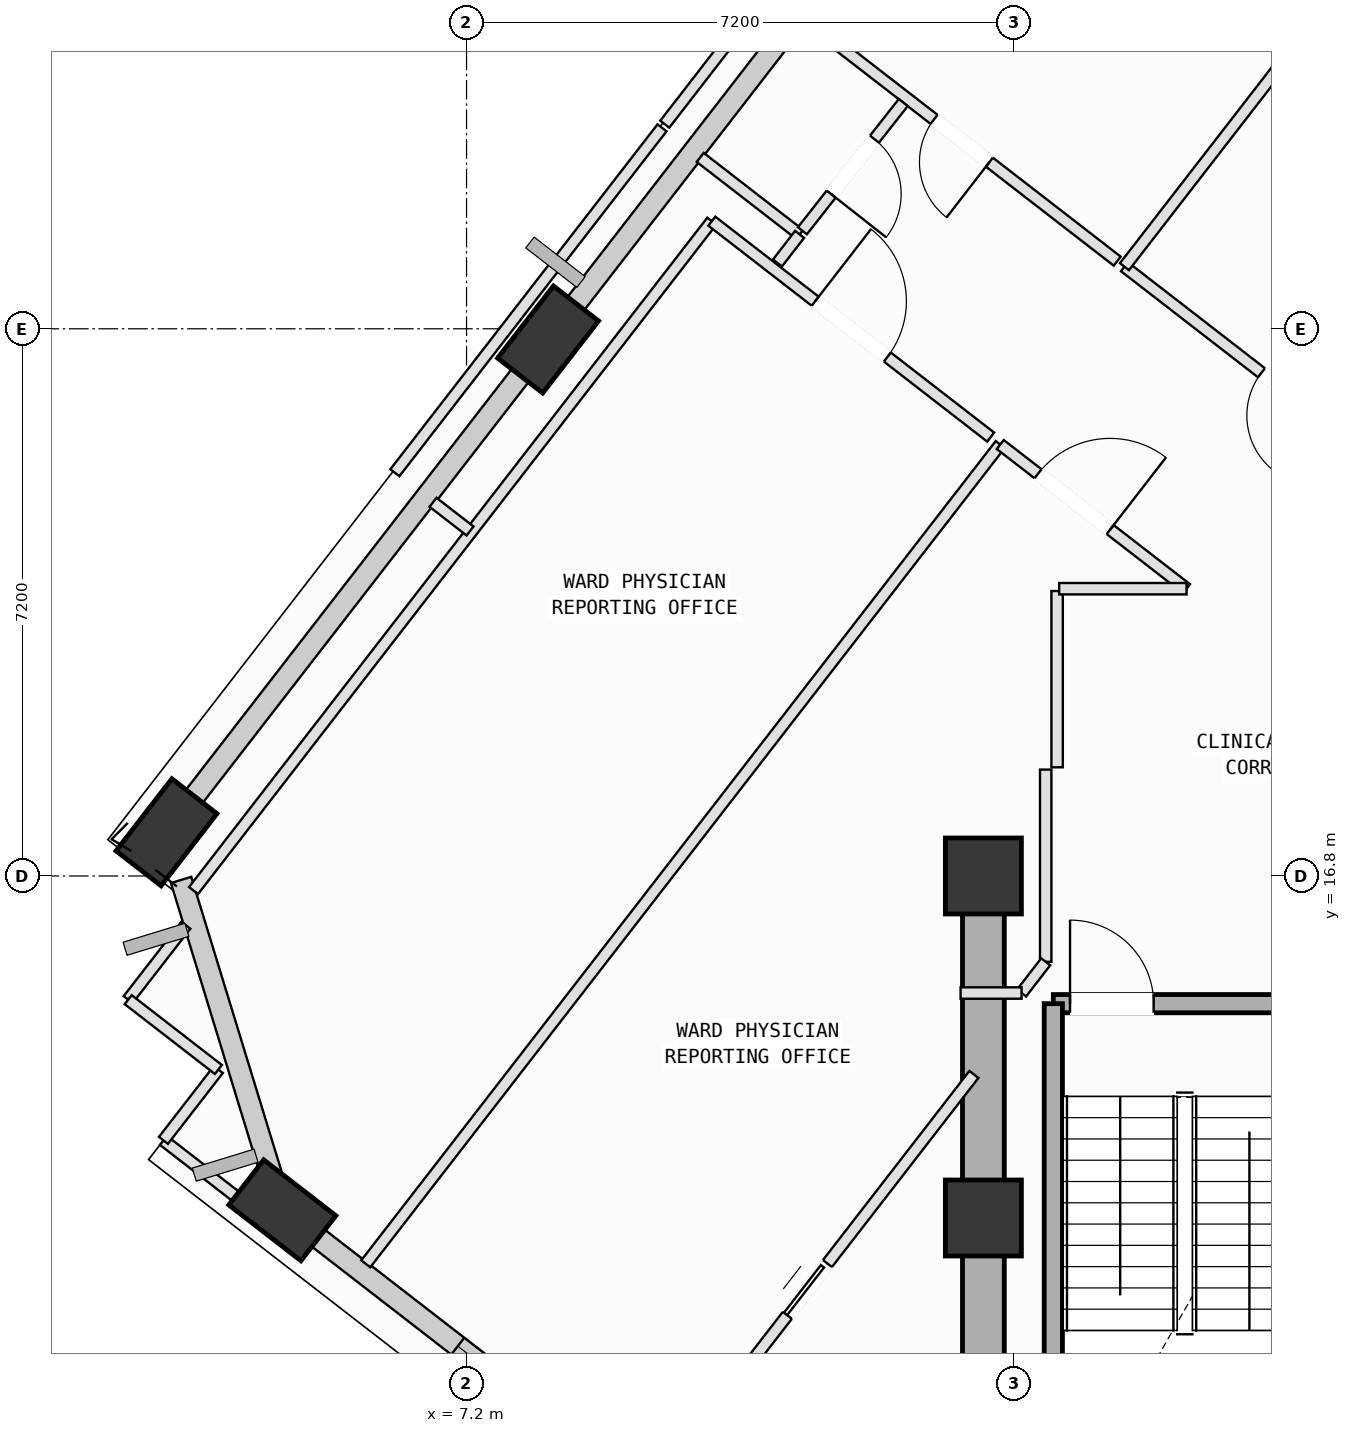
"""IFC4 building model, lengths in metres.
Left out: names, types, materials, properties, quantities, classifications, styles, units other than length and angle.
Written with IfcOpenShell. Run it as: python <this file> out.ifc"""

import sys

from ifc_helpers import new_model, si_unit, direction, frame, frame_2d, origin, origin_2d, place, context, subcontext, project, spatial, rectangle, extrude, element, fill, save


model = new_model("IFC4")
c1 = context("Model", 3, precision=1e-05, world=origin(), true_north=direction((0.0, 1.0)))
c2 = subcontext(c1, "Body", "Model", "MODEL_VIEW")
j1 = project(units=[si_unit("LENGTHUNIT", "METRE"), si_unit("PLANEANGLEUNIT", "RADIAN")], contexts=[c1])
p1 = place(None, origin())
s1 = spatial("IfcSite", under=j1, at=p1, CompositionType="ELEMENT")
p2 = place(p1, origin())
s2 = spatial("IfcBuilding", under=s1, at=p2, CompositionType="ELEMENT")
p3 = place(p2, frame((0.0, 0.0, 247.2)))
s3 = spatial("IfcBuildingStorey", under=s2, at=p3, CompositionType="ELEMENT", Elevation=247.2)
for number, where, z_axis, x_axis in (
    (1, (14.0, 12.3, 0.0), (0.0, 0.0, 1.0), (1.0, 0.0, 0.0)),
    (2, (14.0, 16.8, 0.0), (0.0, 0.0, 1.0), (1.0, 0.0, 0.0)),
):
    element("IfcColumn", number, at=place(p3, frame(where, z_axis=z_axis, x_axis=x_axis)), inside=s3, PredefinedType="COLUMN", context=c2, shape_type="SweptSolid", body=[
        extrude(rectangle(XDim=1.0, YDim=1.0, at=origin_2d()), origin(), (0.0, 0.0, 1.0), 4.0),
    ])
p4 = place(p3, frame((8.272, 23.859, 0.002), z_axis=(0.00479977683, -0.104379956889, 0.994525910543), x_axis=(0.575449404971, 0.813653503986, 0.082619354686)))
e3 = element("IfcColumn", 3, at=p4, inside=s3, PredefinedType="COLUMN", context=c2, shape_type="SweptSolid", body=[
    extrude(rectangle(XDim=1.2, YDim=0.75, at=origin_2d()), origin(), (0.0, 0.0, 1.0), 4.018),
])
p5 = place(p3, frame((3.252, 17.375, 0.002), z_axis=(0.031564824707, -0.124502331616, 0.991717112519), x_axis=(0.400737327413, 0.910546939736, 0.101557200414)))
e4 = element("IfcColumn", 4, at=p5, inside=s3, PredefinedType="COLUMN", context=c2, shape_type="SweptSolid", body=[
    extrude(rectangle(XDim=1.2, YDim=0.75, at=origin_2d()), origin(), (0.0, 0.0, 1.0), 4.03),
])
p6 = place(p3, frame((4.776, 12.401, 0.002), z_axis=(0.051917734031, -0.11807195289, 0.991646894229), x_axis=(-0.96817687498, 0.237482706263, 0.078965201073)))
e5 = element("IfcColumn", 5, at=p6, inside=s3, PredefinedType="COLUMN", context=c2, shape_type="SweptSolid", body=[
    extrude(rectangle(XDim=1.2, YDim=0.75, at=origin_2d()), origin(), (0.0, 0.0, 1.0), 4.03),
])
p7 = place(p3, frame((8.403, 24.028, 0.0), z_axis=(0.0, 0.0, 1.0), x_axis=(0.61220895988, 0.790696015826, 0.0)))
e6 = element("IfcWall", 6, at=p7, inside=s3, PredefinedType="SOLIDWALL", context=c2, shape_type="SweptSolid", body=[
    extrude(rectangle(XDim=7.434, YDim=0.28, at=frame_2d((3.717, 0.0))), origin(), (0.0, 0.0, 1.0), 3.265),
])
p8 = place(p3, frame((3.364, 17.519, 0.0), z_axis=(0.0, 0.0, 1.0), x_axis=(0.612209375749, 0.790695693832, 0.0)))
e7 = element("IfcWall", 7, at=p8, inside=s3, PredefinedType="SOLIDWALL", context=c2, shape_type="SweptSolid", body=[
    extrude(rectangle(XDim=7.485, YDim=0.28, at=frame_2d((3.742, 0.0))), origin(), (0.0, 0.0, 1.0), 3.265),
])
p9 = place(p3, frame((4.736, 12.533, 0.0), z_axis=(0.0, 0.0, 1.0), x_axis=(-0.29287135158, 0.956151855839, 0.0)))
e8 = element("IfcWall", 8, at=p9, inside=s3, PredefinedType="SOLIDWALL", context=c2, shape_type="SweptSolid", body=[
    extrude(rectangle(XDim=4.408, YDim=0.28, at=frame_2d((2.204, 0.0))), origin(), (0.0, 0.0, 1.0), 3.265),
])
p10 = place(p3, frame((9.865, 8.461, 0.0), z_axis=(0.0, 0.0, 1.0), x_axis=(-0.790689704837, 0.612217110725, 0.0)))
e9 = element("IfcWall", 9, at=p10, inside=s3, PredefinedType="SOLIDWALL", context=c2, shape_type="SweptSolid", body=[
    extrude(rectangle(XDim=5.83, YDim=0.28, at=frame_2d((2.915, 0.0))), origin(), (0.0, 0.0, 1.0), 3.265),
])
p11 = place(p10, frame((2.117, 0.0, 0.75)))
e10 = element("IfcOpeningElement", 10, at=p11, cuts=e9, PredefinedType="OPENING", context=c2, shape_type="SweptSolid", body=[
    extrude(rectangle(XDim=1.4, YDim=1.85, at=frame_2d((0.7, 0.925))), frame((0.0, 0.15, 0.0), z_axis=(0.0, -1.0, 0.0), x_axis=(1.0, 0.0, 0.0)), (0.0, 0.0, 1.0), 0.3),
])
p12 = place(p3, frame((14.92, 15.12, 0.0), z_axis=(0.0, 0.0, 1.0), x_axis=(1.0, 0.0, 0.0)))
e11 = element("IfcWall", 11, at=p12, inside=s3, PredefinedType="SOLIDWALL", context=c2, shape_type="SweptSolid", body=[
    extrude(rectangle(XDim=3.46, YDim=0.24, at=frame_2d((1.73, 0.0))), origin(), (0.0, 0.0, 1.0), 3.78),
])
p13 = place(p12, frame((0.22, 0.0, 0.0)))
e12 = element("IfcOpeningElement", 12, at=p13, cuts=e11, PredefinedType="OPENING", context=c2, shape_type="SweptSolid", body=[
    extrude(rectangle(XDim=1.1, YDim=2.15, at=frame_2d((0.55, 1.075))), frame((0.0, 0.13, 0.0), z_axis=(0.0, -1.0, 0.0), x_axis=(1.0, 0.0, 0.0)), (0.0, 0.0, 1.0), 0.26),
])
p14 = place(p3, frame((14.92, 8.075, 0.0), z_axis=(0.0, 0.0, 1.0), x_axis=(0.0, 1.0, 0.0)))
e13 = element("IfcWall", 13, at=p14, inside=s3, PredefinedType="SOLIDWALL", context=c2, shape_type="SweptSolid", body=[
    extrude(rectangle(XDim=7.045, YDim=0.24, at=frame_2d((3.522, 0.0))), origin(), (0.0, 0.0, 1.0), 3.78),
])
p15 = place(p3, frame((14.0, 16.8, 0.0), z_axis=(0.0, 0.0, 1.0), x_axis=(0.0, -1.0, 0.0)))
e14 = element("IfcWall", 14, at=p15, inside=s3, PredefinedType="SHEAR", context=c2, shape_type="SweptSolid", body=[
    extrude(rectangle(XDim=9.0, YDim=0.55, at=frame_2d((4.5, 0.0))), origin(), (0.0, 0.0, 1.0), 3.78),
])
p16 = place(p3, frame((9.67, 8.758, 0.0), z_axis=(0.0, 0.0, 1.0), x_axis=(0.612219073781, 0.790688184874, 0.0)))
e15 = element("IfcWall", 15, at=p16, inside=s3, PredefinedType="PARTITIONING", context=c2, shape_type="SweptSolid", body=[
    extrude(rectangle(XDim=6.869, YDim=0.15, at=frame_2d((3.434, 0.0))), origin(), (0.0, 0.0, 1.0), 3.78),
])
p17 = place(p16, frame((2.861, 0.0, 0.0)))
e16 = element("IfcOpeningElement", 16, at=p17, cuts=e15, PredefinedType="OPENING", context=c2, shape_type="SweptSolid", body=[
    extrude(rectangle(XDim=0.86, YDim=2.06, at=frame_2d((0.43, 1.03))), frame((0.0, 0.085, 0.0), z_axis=(0.0, -1.0, 0.0), x_axis=(1.0, 0.0, 0.0)), (0.0, 0.0, 1.0), 0.17),
])
p18 = place(p3, frame((14.97, 20.55, 0.0), z_axis=(0.0, 0.0, 1.0), x_axis=(0.0, -1.0, 0.0)))
e17 = element("IfcWall", 17, at=p18, inside=s3, PredefinedType="PARTITIONING", context=c2, shape_type="SweptSolid", body=[
    extrude(rectangle(XDim=2.32, YDim=0.15, at=frame_2d((1.16, 0.0))), origin(), (0.0, 0.0, 1.0), 3.78),
])
p19 = place(p3, frame((14.82, 18.2, 0.0), z_axis=(0.0, 0.0, 1.0), x_axis=(0.0, -1.0, 0.0)))
e18 = element("IfcWall", 18, at=p19, inside=s3, PredefinedType="PARTITIONING", context=c2, shape_type="SweptSolid", body=[
    extrude(rectangle(XDim=2.529, YDim=0.15, at=frame_2d((1.265, 0.0))), origin(), (0.0, 0.0, 1.0), 3.78),
])
p20 = place(p3, frame((14.82, 15.671, 0.0), z_axis=(0.0, 0.0, 1.0), x_axis=(-0.612182668934, -0.790716371309, 0.0)))
e19 = element("IfcWall", 19, at=p20, inside=s3, PredefinedType="PARTITIONING", context=c2, shape_type="SweptSolid", body=[
    extrude(rectangle(XDim=0.52, YDim=0.15, at=frame_2d((0.26, 0.0))), origin(), (0.0, 0.0, 1.0), 3.78),
])
p21 = place(p3, frame((14.502, 15.26, 0.0), z_axis=(0.0, 0.0, 1.0), x_axis=(-1.0, 0.0, 0.0)))
e20 = element("IfcWall", 20, at=p21, inside=s3, PredefinedType="PARTITIONING", context=c2, shape_type="SweptSolid", body=[
    extrude(rectangle(XDim=0.802, YDim=0.15, at=frame_2d((0.401, 0.0))), origin(), (0.0, 0.0, 1.0), 3.78),
])
p22 = place(p3, frame((5.874, 11.697, 0.0), z_axis=(0.0, 0.0, 1.0), x_axis=(0.612268172049, 0.790650166316, 0.0)))
e21 = element("IfcWall", 21, at=p22, inside=s3, PredefinedType="PARTITIONING", context=c2, shape_type="SweptSolid", body=[
    extrude(rectangle(XDim=13.634, YDim=0.15, at=frame_2d((6.817, 0.0))), origin(), (0.0, 0.0, 1.0), 3.78),
])
p23 = place(p3, frame((14.222, 22.477, 0.0), z_axis=(0.0, 0.0, 1.0), x_axis=(0.790834390633, -0.612030200719, 0.0)))
e22 = element("IfcWall", 22, at=p23, inside=s3, PredefinedType="PARTITIONING", context=c2, shape_type="SweptSolid", body=[
    extrude(rectangle(XDim=3.099, YDim=0.15, at=frame_2d((1.55, 0.0))), origin(), (0.0, 0.0, 1.0), 3.78),
])
p24 = place(p23, frame((0.628, 0.0, 0.0)))
e23 = element("IfcOpeningElement", 23, at=p24, cuts=e22, PredefinedType="OPENING", context=c2, shape_type="SweptSolid", body=[
    extrude(rectangle(XDim=1.2, YDim=2.15, at=frame_2d((0.6, 1.075))), frame((0.0, 0.085, 0.0), z_axis=(0.0, -1.0, 0.0), x_axis=(1.0, 0.0, 0.0)), (0.0, 0.0, 1.0), 0.17),
])
p25 = place(p3, frame((16.673, 20.58, 0.0), z_axis=(0.0, 0.0, 1.0), x_axis=(-1.0, 0.0, 0.0)))
e24 = element("IfcWall", 24, at=p25, inside=s3, PredefinedType="PARTITIONING", context=c2, shape_type="SweptSolid", body=[
    extrude(rectangle(XDim=1.676, YDim=0.15, at=frame_2d((0.838, 0.0))), origin(), (0.0, 0.0, 1.0), 3.78),
])
p26 = place(p3, frame((2.748, 15.173, 0.0), z_axis=(0.0, 0.0, 1.0), x_axis=(0.612725563418, 0.790295757255, 0.0)))
e25 = element("IfcWall", 25, at=p26, inside=s3, PredefinedType="PARTITIONING", context=c2, shape_type="SweptSolid", body=[
    extrude(rectangle(XDim=1.239, YDim=0.15, at=frame_2d((0.619, 0.0))), origin(), (0.0, 0.0, 1.0), 3.78),
])
p27 = place(p3, frame((3.608, 16.608, 0.0), z_axis=(0.0, 0.0, 1.0), x_axis=(0.612168330421, 0.790727472161, 0.0)))
e26 = element("IfcWall", 26, at=p27, inside=s3, PredefinedType="PARTITIONING", context=c2, shape_type="SweptSolid", body=[
    extrude(rectangle(XDim=11.139, YDim=0.15, at=frame_2d((5.57, 0.0))), origin(), (0.0, 0.0, 1.0), 3.265),
])
p28 = place(p3, frame((10.427, 25.416, 0.0), z_axis=(0.0, 0.0, 1.0), x_axis=(0.790662088337, -0.612252776283, 0.0)))
e27 = element("IfcWall", 27, at=p28, inside=s3, PredefinedType="PARTITIONING", context=c2, shape_type="SweptSolid", body=[
    extrude(rectangle(XDim=4.64, YDim=0.15, at=frame_2d((2.32, 0.0))), origin(), (0.0, 0.0, 1.0), 3.415),
])
p29 = place(p28, frame((1.72, 0.0, 0.0)))
e28 = element("IfcOpeningElement", 28, at=p29, cuts=e27, PredefinedType="OPENING", context=c2, shape_type="SweptSolid", body=[
    extrude(rectangle(XDim=1.2, YDim=2.15, at=frame_2d((0.6, 1.075))), frame((0.0, 0.085, 0.0), z_axis=(0.0, -1.0, 0.0), x_axis=(1.0, 0.0, 0.0)), (0.0, 0.0, 1.0), 0.17),
])
p30 = place(p3, frame((5.115, 11.848, 0.0), z_axis=(0.0, 0.0, 1.0), x_axis=(-0.790764891101, 0.612119993958, 0.0)))
e29 = element("IfcWall", 29, at=p30, inside=s3, PredefinedType="PARTITIONING", context=c2, shape_type="SweptSolid", body=[
    extrude(rectangle(XDim=2.407, YDim=0.15, at=frame_2d((1.203, 0.0))), origin(), (0.0, 0.0, 1.0), 3.265),
])
p31 = place(p3, frame((3.212, 13.321, 0.0), z_axis=(0.0, 0.0, 1.0), x_axis=(0.612665349717, 0.79034243797, 0.0)))
e30 = element("IfcWall", 30, at=p31, inside=s3, PredefinedType="PARTITIONING", context=c2, shape_type="SweptSolid", body=[
    extrude(rectangle(XDim=1.18, YDim=0.15, at=frame_2d((0.59, 0.0))), origin(), (0.0, 0.0, 1.0), 3.78),
])
p32 = place(p3, frame((3.935, 14.254, 0.0), z_axis=(0.0, 0.0, 1.0), x_axis=(-0.790655142264, 0.612261746324, 0.0)))
e31 = element("IfcWall", 31, at=p32, inside=s3, PredefinedType="PARTITIONING", context=c2, shape_type="SweptSolid", body=[
    extrude(rectangle(XDim=1.501, YDim=0.15, at=frame_2d((0.75, 0.0))), origin(), (0.0, 0.0, 1.0), 3.78),
])
p33 = place(p3, frame((20.189, 21.462, 0.0), z_axis=(0.0, 0.0, 1.0), x_axis=(-0.790688923612, 0.612218119691, 0.0)))
e32 = element("IfcWall", 32, at=p33, inside=s3, PredefinedType="PARTITIONING", context=c2, shape_type="SweptSolid", body=[
    extrude(rectangle(XDim=5.48, YDim=0.15, at=frame_2d((2.74, 0.0))), origin(), (0.0, 0.0, 1.0), 3.415),
])
p34 = place(p33, frame((2.28, 0.0, 0.0)))
e33 = element("IfcOpeningElement", 33, at=p34, cuts=e32, PredefinedType="OPENING", context=c2, shape_type="SweptSolid", body=[
    extrude(rectangle(XDim=0.92, YDim=2.1, at=frame_2d((0.46, 1.05))), frame((0.0, 0.085, 0.0), z_axis=(0.0, -1.0, 0.0), x_axis=(1.0, 0.0, 0.0)), (0.0, 0.0, 1.0), 0.17),
])
p35 = place(p3, frame((15.856, 24.817, 0.0), z_axis=(0.0, 0.0, 1.0), x_axis=(0.612343855501, 0.790591552339, 0.0)))
e34 = element("IfcWall", 34, at=p35, inside=s3, PredefinedType="PARTITIONING", context=c2, shape_type="SweptSolid", body=[
    extrude(rectangle(XDim=4.068, YDim=0.15, at=frame_2d((2.034, 0.0))), origin(), (0.0, 0.0, 1.0), 3.78),
])
p36 = place(p3, frame((15.761, 24.89, 0.0), z_axis=(0.0, 0.0, 1.0), x_axis=(-0.790706764685, 0.612195076983, 0.0)))
e35 = element("IfcWall", 35, at=p36, inside=s3, PredefinedType="PARTITIONING", context=c2, shape_type="SweptSolid", body=[
    extrude(rectangle(XDim=5.175, YDim=0.15, at=frame_2d((2.587, 0.0))), origin(), (0.0, 0.0, 1.0), 3.78),
])
p37 = place(p36, frame((2.127, 0.0, 0.0)))
e36 = element("IfcOpeningElement", 36, at=p37, cuts=e35, PredefinedType="OPENING", context=c2, shape_type="SweptSolid", body=[
    extrude(rectangle(XDim=0.92, YDim=2.1, at=frame_2d((0.46, 1.05))), frame((0.0, 0.085, 0.0), z_axis=(0.0, -1.0, 0.0), x_axis=(1.0, 0.0, 0.0)), (0.0, 0.0, 1.0), 0.17),
])
p38 = place(p3, frame((7.246, 21.34, 0.0), z_axis=(0.0, 0.0, 1.0), x_axis=(-0.790822733383, 0.61204526333, 0.0)))
e37 = element("IfcWall", 37, at=p38, inside=s3, PredefinedType="PARTITIONING", context=c2, shape_type="SweptSolid", body=[
    extrude(rectangle(XDim=0.616, YDim=0.15, at=frame_2d((0.308, 0.0))), origin(), (0.0, 0.0, 1.0), 3.78),
])
p39 = place(p3, frame((6.257, 22.106, 0.0), z_axis=(0.0, 0.0, 1.0), x_axis=(0.612340459049, 0.790594183011, 0.0)))
e38 = element("IfcWall", 38, at=p39, inside=s3, PredefinedType="PARTITIONING", context=c2, shape_type="SweptSolid", body=[
    extrude(rectangle(XDim=5.74, YDim=0.15, at=frame_2d((2.87, 0.0))), origin(), (0.0, 0.0, 1.0), 3.78),
])
p40 = place(p3, frame((10.274, 26.255, 0.0), z_axis=(0.0, 0.0, 1.0), x_axis=(0.790661489403, -0.612253549745, 0.0)))
e39 = element("IfcWall", 39, at=p40, inside=s3, PredefinedType="PARTITIONING", context=c2, shape_type="SweptSolid", body=[
    extrude(rectangle(XDim=1.655, YDim=0.15, at=frame_2d((0.827, 0.0))), origin(), (0.0, 0.0, 1.0), 3.78),
])
p41 = place(p3, frame((11.582, 25.242, 0.0), z_axis=(0.0, 0.0, 1.0), x_axis=(-0.612090334944, -0.790787848837, 0.0)))
e40 = element("IfcWall", 40, at=p41, inside=s3, PredefinedType="PARTITIONING", context=c2, shape_type="SweptSolid", body=[
    extrude(rectangle(XDim=0.475, YDim=0.15, at=frame_2d((0.238, 0.0))), origin(), (0.0, 0.0, 1.0), 3.78),
])
p42 = place(p3, frame((12.946, 26.977, 0.0), z_axis=(0.0, 0.0, 1.0), x_axis=(-0.618293625279, -0.785947194753, 0.0)))
e41 = element("IfcWall", 41, at=p42, inside=s3, PredefinedType="PARTITIONING", context=c2, shape_type="SweptSolid", body=[
    extrude(rectangle(XDim=2.146, YDim=0.15, at=frame_2d((1.073, 0.0))), origin(), (0.0, 0.0, 1.0), 3.78),
])
p43 = place(p42, frame((0.613, 0.0, 0.0)))
e42 = element("IfcOpeningElement", 42, at=p43, cuts=e41, PredefinedType="OPENING", context=c2, shape_type="SweptSolid", body=[
    extrude(rectangle(XDim=0.92, YDim=2.1, at=frame_2d((0.46, 1.05))), frame((0.0, 0.085, 0.0), z_axis=(0.0, -1.0, 0.0), x_axis=(1.0, 0.0, 0.0)), (0.0, 0.0, 1.0), 0.17),
])
p44 = place(p3, frame((9.808, 26.692, 0.0), z_axis=(0.0, 0.0, 1.0), x_axis=(0.612209439056, 0.790695644816, 0.0)))
e43 = element("IfcWall", 43, at=p44, inside=s3, PredefinedType="PARTITIONING", context=c2, shape_type="SweptSolid", body=[
    extrude(rectangle(XDim=5.57, YDim=0.15, at=frame_2d((2.785, 0.0))), origin(), (0.0, 0.0, 1.0), 3.78),
])
p45 = place(p11, origin())
e44 = element("IfcWindow", 44, at=p45, inside=s3, PartitioningType="SINGLE_PANEL", PredefinedType="WINDOW", context=c2, shape_type="SweptSolid", body=[
    extrude(rectangle(XDim=1.4, YDim=1.85, at=frame_2d((0.7, 0.925))), frame((0.0, 0.03, 0.0), z_axis=(0.0, -1.0, 0.0), x_axis=(1.0, 0.0, 0.0)), (0.0, 0.0, 1.0), 0.06),
])
fill(e10, e44)
p46 = place(p13, origin())
e45 = element("IfcDoor", 45, at=p46, inside=s3, OperationType="SINGLE_SWING_LEFT", PredefinedType="DOOR", context=c2, shape_type="SweptSolid", body=[
    extrude(rectangle(XDim=1.1, YDim=2.15, at=frame_2d((0.55, 1.075))), frame((0.0, 0.025, 0.0), z_axis=(0.0, -1.0, 0.0), x_axis=(1.0, 0.0, 0.0)), (0.0, 0.0, 1.0), 0.05),
])
fill(e12, e45)
p47 = place(p24, origin())
e46 = element("IfcDoor", 46, at=p47, inside=s3, OperationType="SINGLE_SWING_RIGHT", PredefinedType="DOOR", context=c2, shape_type="SweptSolid", body=[
    extrude(rectangle(XDim=1.2, YDim=2.15, at=frame_2d((0.6, 1.075))), frame((0.0, 0.025, 0.0), z_axis=(0.0, -1.0, 0.0), x_axis=(1.0, 0.0, 0.0)), (0.0, 0.0, 1.0), 0.05),
])
fill(e23, e46)
p48 = place(p29, origin())
e47 = element("IfcDoor", 47, at=p48, inside=s3, OperationType="SINGLE_SWING_LEFT", PredefinedType="DOOR", context=c2, shape_type="SweptSolid", body=[
    extrude(rectangle(XDim=1.2, YDim=2.15, at=frame_2d((0.6, 1.075))), frame((0.0, 0.025, 0.0), z_axis=(0.0, -1.0, 0.0), x_axis=(1.0, 0.0, 0.0)), (0.0, 0.0, 1.0), 0.05),
])
fill(e28, e47)
p49 = place(p34, origin())
e48 = element("IfcDoor", 48, at=p49, inside=s3, OperationType="SINGLE_SWING_LEFT", PredefinedType="DOOR", context=c2, shape_type="SweptSolid", body=[
    extrude(rectangle(XDim=0.92, YDim=2.1, at=frame_2d((0.46, 1.05))), frame((0.0, 0.025, 0.0), z_axis=(0.0, -1.0, 0.0), x_axis=(1.0, 0.0, 0.0)), (0.0, 0.0, 1.0), 0.05),
])
fill(e33, e48)
p50 = place(p37, origin())
e49 = element("IfcDoor", 49, at=p50, inside=s3, OperationType="SINGLE_SWING_LEFT", PredefinedType="DOOR", context=c2, shape_type="SweptSolid", body=[
    extrude(rectangle(XDim=0.92, YDim=2.1, at=frame_2d((0.46, 1.05))), frame((0.0, 0.025, 0.0), z_axis=(0.0, -1.0, 0.0), x_axis=(1.0, 0.0, 0.0)), (0.0, 0.0, 1.0), 0.05),
])
fill(e36, e49)
p51 = place(p43, origin())
e50 = element("IfcDoor", 50, at=p51, inside=s3, OperationType="SINGLE_SWING_RIGHT", PredefinedType="DOOR", context=c2, shape_type="SweptSolid", body=[
    extrude(rectangle(XDim=0.92, YDim=2.1, at=frame_2d((0.46, 1.05))), frame((0.0, 0.025, 0.0), z_axis=(0.0, -1.0, 0.0), x_axis=(1.0, 0.0, 0.0)), (0.0, 0.0, 1.0), 0.05),
])
fill(e42, e50)
p52 = place(p17, origin())
e51 = element("IfcDoor", 51, at=p52, inside=s3, OperationType="SLIDING_TO_LEFT", PredefinedType="DOOR", context=c2, shape_type="SweptSolid", body=[
    extrude(rectangle(XDim=0.86, YDim=2.06, at=frame_2d((0.43, 1.03))), frame((0.0, 0.025, 0.0), z_axis=(0.0, -1.0, 0.0), x_axis=(1.0, 0.0, 0.0)), (0.0, 0.0, 1.0), 0.05),
])
fill(e16, e51)
save(model, sys.argv[1])
